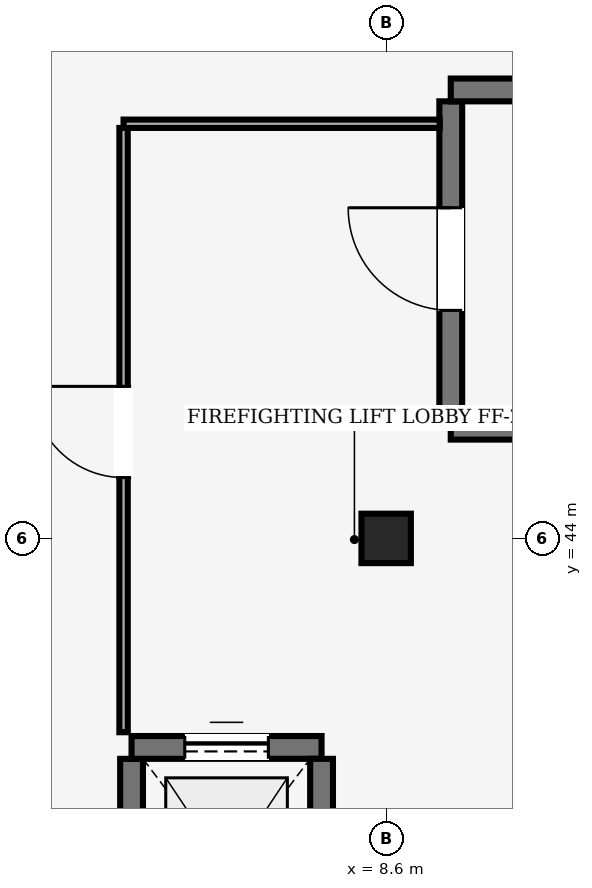
"""IFC4 building model, lengths in metres.
Left out: names, types, materials, properties, quantities, classifications, styles, units other than length and angle.
Written with IfcOpenShell. Run it as: python <this file> out.ifc"""

import sys

from ifc_helpers import new_model, si_unit, direction, frame, frame_2d, origin, origin_2d, place, context, subcontext, project, spatial, rectangle, extrude, element, fill, save


model = new_model("IFC4")
c1 = context("Model", 3, precision=1e-05, world=origin(), true_north=direction((0.0, 1.0)))
c2 = subcontext(c1, "Body", "Model", "MODEL_VIEW")
j1 = project(units=[si_unit("LENGTHUNIT", "METRE"), si_unit("PLANEANGLEUNIT", "RADIAN")], contexts=[c1])
p1 = place(None, origin())
s1 = spatial("IfcSite", under=j1, at=p1, CompositionType="ELEMENT")
p2 = place(p1, origin())
s2 = spatial("IfcBuilding", under=s1, at=p2, CompositionType="ELEMENT")
p3 = place(p2, frame((0.0, 0.0, 12.0)))
s3 = spatial("IfcBuildingStorey", under=s2, at=p3, CompositionType="ELEMENT", Elevation=12.0)
p4 = place(p3, frame((8.6, 44.0, 0.0), z_axis=(0.0, 0.0, 1.0), x_axis=(1.0, 0.0, 0.0)))
e1 = element("IfcColumn", 1, at=p4, inside=s3, PredefinedType="COLUMN", context=c2, shape_type="SweptSolid", body=[
    extrude(rectangle(XDim=0.65, YDim=0.65, at=origin_2d()), origin(), (0.0, 0.0, 1.0), 3.35),
])
p5 = place(p3, frame((19.63, 45.45, 0.0), z_axis=(0.0, 0.0, 1.0), x_axis=(-1.0, 0.0, 0.0)))
e2 = element("IfcWall", 2, at=p5, inside=s3, PredefinedType="SHEAR", context=c2, shape_type="SweptSolid", body=[
    extrude(rectangle(XDim=10.18, YDim=0.3, at=frame_2d((5.09, 0.0))), origin(), (0.0, 0.0, 1.0), 3.35),
])
p6 = place(p3, frame((9.45, 45.6, 0.0), z_axis=(0.0, 0.0, 1.0), x_axis=(0.0, 1.0, 0.0)))
e3 = element("IfcWall", 3, at=p6, inside=s3, PredefinedType="SHEAR", context=c2, shape_type="SweptSolid", body=[
    extrude(rectangle(XDim=4.15, YDim=0.3, at=frame_2d((2.075, 0.0))), origin(), (0.0, 0.0, 1.0), 3.35),
])
p7 = place(p6, frame((1.4, 0.0, 0.0)))
e4 = element("IfcOpeningElement", 4, at=p7, cuts=e3, PredefinedType="OPENING", context=c2, shape_type="SweptSolid", body=[
    extrude(rectangle(XDim=1.35, YDim=2.2, at=frame_2d((0.675, 1.1))), frame((0.0, 0.15, 0.0), z_axis=(0.0, -1.0, 0.0), x_axis=(1.0, 0.0, 0.0)), (0.0, 0.0, 1.0), 0.3),
])
p8 = place(p3, frame((9.45, 49.9, 0.0), z_axis=(0.0, 0.0, 1.0), x_axis=(1.0, 0.0, 0.0)))
e5 = element("IfcWall", 5, at=p8, inside=s3, PredefinedType="SHEAR", context=c2, shape_type="SweptSolid", body=[
    extrude(rectangle(XDim=10.18, YDim=0.3, at=frame_2d((5.09, 0.0))), origin(), (0.0, 0.0, 1.0), 3.35),
])
p9 = place(p3, frame((5.25, 38.2, 0.0), z_axis=(0.0, 0.0, 1.0), x_axis=(0.0, 1.0, 0.0)))
e6 = element("IfcWall", 6, at=p9, inside=s3, PredefinedType="SHEAR", context=c2, shape_type="SweptSolid", body=[
    extrude(rectangle(XDim=2.9, YDim=0.3, at=frame_2d((1.45, 0.0))), origin(), (0.0, 0.0, 1.0), 3.35),
])
p10 = place(p3, frame((5.25, 41.25, 0.0), z_axis=(0.0, 0.0, 1.0), x_axis=(1.0, 0.0, 0.0)))
e7 = element("IfcWall", 7, at=p10, inside=s3, PredefinedType="SHEAR", context=c2, shape_type="SweptSolid", body=[
    extrude(rectangle(XDim=2.5, YDim=0.3, at=frame_2d((1.25, 0.0))), origin(), (0.0, 0.0, 1.0), 3.35),
])
p11 = place(p10, frame((0.7, 0.0, 0.0)))
e8 = element("IfcOpeningElement", 8, at=p11, cuts=e7, PredefinedType="OPENING", context=c2, shape_type="SweptSolid", body=[
    extrude(rectangle(XDim=1.1, YDim=2.1, at=frame_2d((0.55, 1.05))), frame((0.0, 0.15, 0.0), z_axis=(0.0, -1.0, 0.0), x_axis=(1.0, 0.0, 0.0)), (0.0, 0.0, 1.0), 0.3),
])
p12 = place(p3, frame((7.75, 41.1, 0.0), z_axis=(0.0, 0.0, 1.0), x_axis=(0.0, -1.0, 0.0)))
e9 = element("IfcWall", 9, at=p12, inside=s3, PredefinedType="SHEAR", context=c2, shape_type="SweptSolid", body=[
    extrude(rectangle(XDim=2.9, YDim=0.3, at=frame_2d((1.45, 0.0))), origin(), (0.0, 0.0, 1.0), 3.35),
])
p13 = place(p3, frame((5.145, 41.45, 0.0), z_axis=(0.0, 0.0, 1.0), x_axis=(0.0, 1.0, 0.0)))
e10 = element("IfcWall", 10, at=p13, inside=s3, PredefinedType="PARTITIONING", context=c2, shape_type="SweptSolid", body=[
    extrude(rectangle(XDim=7.95, YDim=0.11, at=frame_2d((3.975, 0.0))), origin(), (0.0, 0.0, 1.0), 3.33),
])
p14 = place(p13, frame((3.35, 0.0, 0.0)))
e11 = element("IfcOpeningElement", 11, at=p14, cuts=e10, PredefinedType="OPENING", context=c2, shape_type="SweptSolid", body=[
    extrude(rectangle(XDim=1.2, YDim=2.15, at=frame_2d((0.6, 1.075))), frame((0.0, 0.055, 0.0), z_axis=(0.0, -1.0, 0.0), x_axis=(1.0, 0.0, 0.0)), (0.0, 0.0, 1.0), 0.11),
])
p15 = place(p3, frame((5.145, 49.455, 0.0), z_axis=(0.0, 0.0, 1.0), x_axis=(1.0, 0.0, 0.0)))
e12 = element("IfcWall", 12, at=p15, inside=s3, PredefinedType="PARTITIONING", context=c2, shape_type="SweptSolid", body=[
    extrude(rectangle(XDim=4.16, YDim=0.11, at=frame_2d((2.08, 0.0))), origin(), (0.0, 0.0, 1.0), 3.33),
])
p16 = place(p7, origin())
e13 = element("IfcDoor", 13, at=p16, inside=s3, OperationType="SINGLE_SWING_RIGHT", PredefinedType="DOOR", context=c2, shape_type="SweptSolid", body=[
    extrude(rectangle(XDim=1.35, YDim=2.2, at=frame_2d((0.675, 1.1))), frame((0.0, 0.025, 0.0), z_axis=(0.0, -1.0, 0.0), x_axis=(1.0, 0.0, 0.0)), (0.0, 0.0, 1.0), 0.05),
])
fill(e4, e13)
p17 = place(p11, origin())
e14 = element("IfcDoor", 14, at=p17, inside=s3, OperationType="SLIDING_TO_LEFT", PredefinedType="DOOR", context=c2, shape_type="SweptSolid", body=[
    extrude(rectangle(XDim=1.1, YDim=2.1, at=frame_2d((0.55, 1.05))), frame((0.0, 0.025, 0.0), z_axis=(0.0, -1.0, 0.0), x_axis=(1.0, 0.0, 0.0)), (0.0, 0.0, 1.0), 0.05),
])
fill(e8, e14)
p18 = place(p14, origin())
e15 = element("IfcDoor", 15, at=p18, inside=s3, OperationType="SINGLE_SWING_RIGHT", PredefinedType="DOOR", context=c2, shape_type="SweptSolid", body=[
    extrude(rectangle(XDim=1.2, YDim=2.15, at=frame_2d((0.6, 1.075))), frame((0.0, 0.025, 0.0), z_axis=(0.0, -1.0, 0.0), x_axis=(1.0, 0.0, 0.0)), (0.0, 0.0, 1.0), 0.05),
])
fill(e11, e15)
save(model, sys.argv[1])
